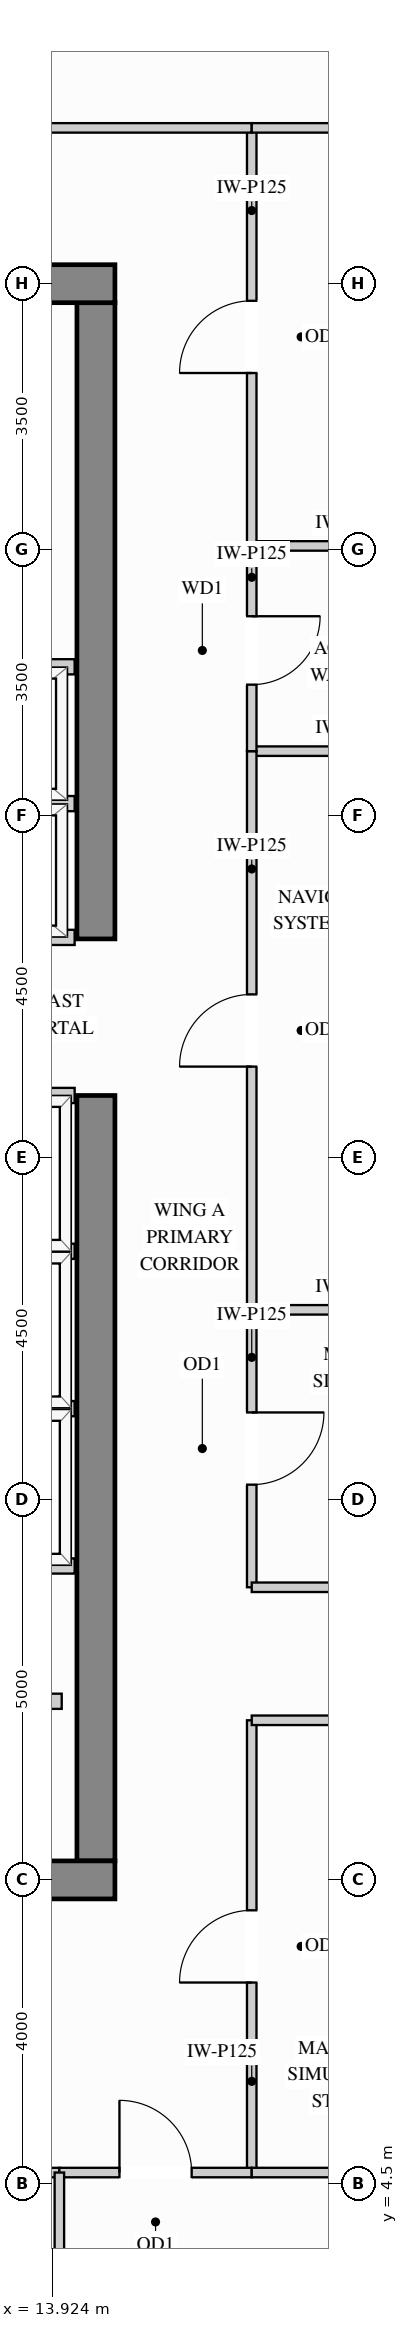
"""IFC4 building model, lengths in metres.
Left out: names, types, materials, properties, quantities, classifications, styles, units other than length and angle.
Written with IfcOpenShell. Run it as: python <this file> out.ifc"""

import sys

from ifc_helpers import new_model, si_unit, direction, frame, frame_2d, origin, place, context, subcontext, project, spatial, rectangle, extrude, source, transform, mapped, element, fill, save


model = new_model("IFC4")
c1 = context("Model", 3, precision=1e-05, world=origin(), true_north=direction((0.0, 1.0)))
c2 = subcontext(c1, "Body", "Model", "MODEL_VIEW")
j1 = project(units=[si_unit("LENGTHUNIT", "METRE"), si_unit("PLANEANGLEUNIT", "RADIAN")], contexts=[c1])
p1 = place(None, origin())
s1 = spatial("IfcSite", under=j1, at=p1, CompositionType="ELEMENT")
p2 = place(p1, origin())
s2 = spatial("IfcBuilding", under=s1, at=p2, CompositionType="ELEMENT")
p3 = place(p2, frame((0.0, 0.0, 255.6)))
s3 = spatial("IfcBuildingStorey", under=s2, at=p3, CompositionType="ELEMENT", Elevation=255.6)
m1 = source(origin(), c2, "Body", "SweptSolid", [
    extrude(rectangle(XDim=10.07, YDim=0.5, at=frame_2d((5.035, 0.0))), origin(), (0.0, 0.0, 1.0), 3.4),
])
p4 = place(p3, frame((14.5, 8.75, 0.0), z_axis=(0.0, 0.0, 1.0), x_axis=(0.0, 1.0, 0.0)))
e1 = element("IfcWall", 1, at=p4, inside=s3, PredefinedType="SHEAR", context=c2, shape_type="MappedRepresentation", body=[
    mapped(m1, transform((0.0, 0.0, 0.0), x_axis=(1.0, 0.0, 0.0), y_axis=(0.0, 1.0, 0.0), z_axis=(0.0, 0.0, 1.0))),
])
m2 = source(origin(), c2, "Body", "SweptSolid", [
    extrude(rectangle(XDim=8.37, YDim=0.5, at=frame_2d((4.185, 0.0))), origin(), (0.0, 0.0, 1.0), 3.4),
])
p5 = place(p3, frame((14.5, 20.88, 0.0), z_axis=(0.0, 0.0, 1.0), x_axis=(0.0, 1.0, 0.0)))
e2 = element("IfcWall", 2, at=p5, inside=s3, PredefinedType="SHEAR", context=c2, shape_type="MappedRepresentation", body=[
    mapped(m2, transform((0.0, 0.0, 0.0), x_axis=(1.0, 0.0, 0.0), y_axis=(0.0, 1.0, 0.0), z_axis=(0.0, 0.0, 1.0))),
])
m3 = source(origin(), c2, "Body", "SweptSolid", [
    extrude(rectangle(XDim=10.5, YDim=0.5, at=frame_2d((5.25, 0.0))), origin(), (0.0, 0.0, 1.0), 3.4),
])
for number, where, z_axis, x_axis in (
    (3, (4.25, 29.5, 0.0), (0.0, 0.0, 1.0), (1.0, 0.0, 0.0)),
    (4, (4.25, 8.5, 0.0), (0.0, 0.0, 1.0), (1.0, 0.0, 0.0)),
):
    element("IfcWall", number, at=place(p3, frame(where, z_axis=z_axis, x_axis=x_axis)), inside=s3, PredefinedType="SHEAR", context=c2, shape_type="MappedRepresentation", body=[
        mapped(m3, transform((0.0, 0.0, 0.0), x_axis=(1.0, 0.0, 0.0), y_axis=(0.0, 1.0, 0.0), z_axis=(0.0, 0.0, 1.0))),
    ])
m4 = source(origin(), c2, "Body", "SweptSolid", [
    extrude(rectangle(XDim=2.6, YDim=0.125, at=frame_2d((1.3, 0.0))), origin(), (0.0, 0.0, 1.0), 3.385),
])
p6 = place(p3, frame((16.55, 16.0, 0.0), z_axis=(0.0, 0.0, 1.0), x_axis=(1.0, 0.0, 0.0)))
e5 = element("IfcWall", 5, at=p6, inside=s3, PredefinedType="PARTITIONING", context=c2, shape_type="MappedRepresentation", body=[
    mapped(m4, transform((0.0, 0.0, 0.0), x_axis=(1.0, 0.0, 0.0), y_axis=(0.0, 1.0, 0.0), z_axis=(0.0, 0.0, 1.0))),
])
m5 = source(origin(), c2, "Body", "SweptSolid", [
    extrude(rectangle(XDim=2.598, YDim=0.125, at=frame_2d((1.299, 0.0))), origin(), (0.0, 0.0, 1.0), 3.385),
])
for number, where, z_axis, x_axis in (
    (6, (16.55, 23.35, 0.0), (0.0, 0.0, 1.0), (1.0, 0.0, 0.0)),
    (7, (16.55, 26.05, 0.0), (0.0, 0.0, 1.0), (1.0, 0.0, 0.0)),
):
    element("IfcWall", number, at=place(p3, frame(where, z_axis=z_axis, x_axis=x_axis)), inside=s3, PredefinedType="PARTITIONING", context=c2, shape_type="MappedRepresentation", body=[
        mapped(m5, transform((0.0, 0.0, 0.0), x_axis=(1.0, 0.0, 0.0), y_axis=(0.0, 1.0, 0.0), z_axis=(0.0, 0.0, 1.0))),
    ])
p7 = place(p3, frame((16.55, 12.35, 0.0), z_axis=(0.0, 0.0, 1.0), x_axis=(0.0, 1.0, 0.0)))
e8 = element("IfcWall", 8, at=p7, inside=s3, PredefinedType="PARTITIONING", context=c2, shape_type="SweptSolid", body=[
    extrude(rectangle(XDim=3.65, YDim=0.125, at=frame_2d((1.825, 0.0))), origin(), (0.0, 0.0, 1.0), 3.385),
])
p8 = place(p7, frame((1.35, 0.0, 0.0)))
e9 = element("IfcOpeningElement", 9, at=p8, cuts=e8, PredefinedType="OPENING", context=c2, shape_type="SweptSolid", body=[
    extrude(rectangle(XDim=0.95, YDim=2.15, at=frame_2d((0.475, 1.075))), frame((0.0, 0.073, 0.0), z_axis=(0.0, -1.0, 0.0), x_axis=(1.0, 0.0, 0.0)), (0.0, 0.0, 1.0), 0.145),
])
p9 = place(p3, frame((16.55, 16.0, 0.0), z_axis=(0.0, 0.0, 1.0), x_axis=(0.0, 1.0, 0.0)))
e10 = element("IfcWall", 10, at=p9, inside=s3, PredefinedType="PARTITIONING", context=c2, shape_type="SweptSolid", body=[
    extrude(rectangle(XDim=7.35, YDim=0.125, at=frame_2d((3.675, 0.0))), origin(), (0.0, 0.0, 1.0), 3.385),
])
p10 = place(p9, frame((3.2, 0.0, 0.0)))
e11 = element("IfcOpeningElement", 11, at=p10, cuts=e10, PredefinedType="OPENING", context=c2, shape_type="SweptSolid", body=[
    extrude(rectangle(XDim=0.95, YDim=2.15, at=frame_2d((0.475, 1.075))), frame((0.0, 0.073, 0.0), z_axis=(0.0, -1.0, 0.0), x_axis=(1.0, 0.0, 0.0)), (0.0, 0.0, 1.0), 0.145),
])
p11 = place(p3, frame((16.55, 26.05, 0.0), z_axis=(0.0, 0.0, 1.0), x_axis=(0.0, 1.0, 0.0)))
e12 = element("IfcWall", 12, at=p11, inside=s3, PredefinedType="PARTITIONING", context=c2, shape_type="SweptSolid", body=[
    extrude(rectangle(XDim=5.5, YDim=0.125, at=frame_2d((2.75, 0.0))), origin(), (0.0, 0.0, 1.0), 3.385),
])
p12 = place(p11, frame((2.275, 0.0, 0.0)))
e13 = element("IfcOpeningElement", 13, at=p12, cuts=e12, PredefinedType="OPENING", context=c2, shape_type="SweptSolid", body=[
    extrude(rectangle(XDim=0.95, YDim=2.15, at=frame_2d((0.475, 1.075))), frame((0.0, 0.073, 0.0), z_axis=(0.0, -1.0, 0.0), x_axis=(1.0, 0.0, 0.0)), (0.0, 0.0, 1.0), 0.145),
])
p13 = place(p3, frame((16.55, 4.65, 0.0), z_axis=(0.0, 0.0, 1.0), x_axis=(0.0, 1.0, 0.0)))
e14 = element("IfcWall", 14, at=p13, inside=s3, PredefinedType="PARTITIONING", context=c2, shape_type="SweptSolid", body=[
    extrude(rectangle(XDim=5.95, YDim=0.125, at=frame_2d((2.975, 0.0))), origin(), (0.0, 0.0, 1.0), 3.385),
])
p14 = place(p13, frame((2.5, 0.0, 0.0)))
e15 = element("IfcOpeningElement", 15, at=p14, cuts=e14, PredefinedType="OPENING", context=c2, shape_type="SweptSolid", body=[
    extrude(rectangle(XDim=0.95, YDim=2.15, at=frame_2d((0.475, 1.075))), frame((0.0, 0.073, 0.0), z_axis=(0.0, -1.0, 0.0), x_axis=(1.0, 0.0, 0.0)), (0.0, 0.0, 1.0), 0.145),
])
p15 = place(p3, frame((16.55, 23.35, 0.0), z_axis=(0.0, 0.0, 1.0), x_axis=(0.0, 1.0, 0.0)))
e16 = element("IfcWall", 16, at=p15, inside=s3, PredefinedType="PARTITIONING", context=c2, shape_type="SweptSolid", body=[
    extrude(rectangle(XDim=2.7, YDim=0.125, at=frame_2d((1.35, 0.0))), origin(), (0.0, 0.0, 1.0), 3.385),
])
p16 = place(p15, frame((0.875, 0.0, 0.0)))
e17 = element("IfcOpeningElement", 17, at=p16, cuts=e16, PredefinedType="OPENING", context=c2, shape_type="SweptSolid", body=[
    extrude(rectangle(XDim=0.9, YDim=2.15, at=frame_2d((0.45, 1.075))), frame((0.0, 0.073, 0.0), z_axis=(0.0, -1.0, 0.0), x_axis=(1.0, 0.0, 0.0)), (0.0, 0.0, 1.0), 0.145),
])
p17 = place(p3, frame((2.45, 31.55, 0.0), z_axis=(0.0, 0.0, 1.0), x_axis=(1.0, 0.0, 0.0)))
e18 = element("IfcWall", 18, at=p17, inside=s3, PredefinedType="PARTITIONING", context=c2, shape_type="SweptSolid", body=[
    extrude(rectangle(XDim=14.1, YDim=0.125, at=frame_2d((7.05, 0.0))), origin(), (0.0, 0.0, 1.0), 3.385),
])
p18 = place(p17, frame((6.575, 0.0, 0.0)))
e19 = element("IfcOpeningElement", 19, at=p18, cuts=e18, PredefinedType="OPENING", context=c2, shape_type="SweptSolid", body=[
    extrude(rectangle(XDim=0.95, YDim=2.15, at=frame_2d((0.475, 1.075))), frame((0.0, 0.073, 0.0), z_axis=(0.0, -1.0, 0.0), x_axis=(1.0, 0.0, 0.0)), (0.0, 0.0, 1.0), 0.145),
])
p19 = place(p3, frame((16.55, 31.55, 0.0), z_axis=(0.0, 0.0, 1.0), x_axis=(1.0, 0.0, 0.0)))
e20 = element("IfcWall", 20, at=p19, inside=s3, PredefinedType="PARTITIONING", context=c2, shape_type="MappedRepresentation", body=[
    mapped(m5, transform((0.0, 0.0, 0.0), x_axis=(1.0, 0.0, 0.0), y_axis=(0.0, 1.0, 0.0), z_axis=(0.0, 0.0, 1.0))),
])
m6 = source(origin(), c2, "Body", "SweptSolid", [
    extrude(rectangle(XDim=2.95, YDim=0.125, at=frame_2d((1.475, 0.0))), origin(), (0.0, 0.0, 1.0), 3.385),
])
for number, where, z_axis, x_axis in (
    (21, (16.55, 12.35, 0.0), (0.0, 0.0, 1.0), (1.0, 0.0, 0.0)),
    (22, (16.55, 10.6, 0.0), (0.0, 0.0, 1.0), (1.0, 0.0, 0.0)),
):
    element("IfcWall", number, at=place(p3, frame(where, z_axis=z_axis, x_axis=x_axis)), inside=s3, PredefinedType="PARTITIONING", context=c2, shape_type="MappedRepresentation", body=[
        mapped(m6, transform((0.0, 0.0, 0.0), x_axis=(1.0, 0.0, 0.0), y_axis=(0.0, 1.0, 0.0), z_axis=(0.0, 0.0, 1.0))),
    ])
p20 = place(p3, frame((8.227, 4.65, 0.0), z_axis=(0.0, 0.0, 1.0), x_axis=(1.0, 0.0, 0.0)))
e23 = element("IfcWall", 23, at=p20, inside=s3, PredefinedType="PARTITIONING", context=c2, shape_type="SweptSolid", body=[
    extrude(rectangle(XDim=5.792, YDim=0.125, at=frame_2d((2.896, 0.0))), origin(), (0.0, 0.0, 1.0), 2.848),
])
p21 = place(p20, frame((2.421, 0.0, 0.0)))
e24 = element("IfcOpeningElement", 24, at=p21, cuts=e23, PredefinedType="OPENING", context=c2, shape_type="SweptSolid", body=[
    extrude(rectangle(XDim=0.95, YDim=2.15, at=frame_2d((0.475, 1.075))), frame((0.0, 0.073, 0.0), z_axis=(0.0, -1.0, 0.0), x_axis=(1.0, 0.0, 0.0)), (0.0, 0.0, 1.0), 0.145),
])
p22 = place(p3, frame((14.019, 4.65, 0.0), z_axis=(0.0, 0.0, 1.0), x_axis=(1.0, 0.0, 0.0)))
e25 = element("IfcWall", 25, at=p22, inside=s3, PredefinedType="PARTITIONING", context=c2, shape_type="SweptSolid", body=[
    extrude(rectangle(XDim=2.531, YDim=0.125, at=frame_2d((1.266, 0.0))), origin(), (0.0, 0.0, 1.0), 2.848),
])
p23 = place(p22, frame((0.791, 0.0, 0.0)))
e26 = element("IfcOpeningElement", 26, at=p23, cuts=e25, PredefinedType="OPENING", context=c2, shape_type="SweptSolid", body=[
    extrude(rectangle(XDim=0.95, YDim=2.15, at=frame_2d((0.475, 1.075))), frame((0.0, 0.073, 0.0), z_axis=(0.0, -1.0, 0.0), x_axis=(1.0, 0.0, 0.0)), (0.0, 0.0, 1.0), 0.145),
])
m7 = source(origin(), c2, "Body", "SweptSolid", [
    extrude(rectangle(XDim=2.6, YDim=0.125, at=frame_2d((1.3, 0.0))), origin(), (0.0, 0.0, 1.0), 2.848),
])
p24 = place(p3, frame((16.55, 4.65, 0.0), z_axis=(0.0, 0.0, 1.0), x_axis=(1.0, 0.0, 0.0)))
e27 = element("IfcWall", 27, at=p24, inside=s3, PredefinedType="PARTITIONING", context=c2, shape_type="MappedRepresentation", body=[
    mapped(m7, transform((0.0, 0.0, 0.0), x_axis=(1.0, 0.0, 0.0), y_axis=(0.0, 1.0, 0.0), z_axis=(0.0, 0.0, 1.0))),
])
m8 = source(origin(), c2, "Body", "SweptSolid", [
    extrude(rectangle(XDim=4.298, YDim=0.125, at=frame_2d((2.149, 0.0))), origin(), (0.0, 0.0, 1.0), 3.385),
])
p25 = place(p3, frame((14.019, 0.352, 0.0), z_axis=(0.0, 0.0, 1.0), x_axis=(0.0, 1.0, 0.0)))
e28 = element("IfcWall", 28, at=p25, inside=s3, PredefinedType="PARTITIONING", context=c2, shape_type="MappedRepresentation", body=[
    mapped(m8, transform((0.0, 0.0, 0.0), x_axis=(1.0, 0.0, 0.0), y_axis=(0.0, 1.0, 0.0), z_axis=(0.0, 0.0, 1.0))),
])
m9 = source(origin(), c2, "Body", "SweptSolid", [
    extrude(rectangle(XDim=1.63, YDim=0.2, at=frame_2d((0.815, 0.0))), origin(), (0.0, 0.0, 1.0), 3.385),
])
p26 = place(p3, frame((12.42, 10.85, 0.0), z_axis=(0.0, 0.0, 1.0), x_axis=(1.0, 0.0, 0.0)))
e29 = element("IfcWall", 29, at=p26, inside=s3, PredefinedType="PARTITIONING", context=c2, shape_type="MappedRepresentation", body=[
    mapped(m9, transform((0.0, 0.0, 0.0), x_axis=(1.0, 0.0, 0.0), y_axis=(0.0, 1.0, 0.0), z_axis=(0.0, 0.0, 1.0))),
])
m10 = source(origin(), c2, "Body", "SweptSolid", [
    extrude(rectangle(XDim=2.39, YDim=0.2, at=frame_2d((1.195, 0.0))), origin(), (0.0, 0.0, 1.0), 3.385),
])
for number, where, z_axis, x_axis in (
    (30, (11.83, 22.66, 0.0), (0.0, 0.0, 1.0), (1.0, 0.0, 0.0)),
    (31, (11.83, 20.9, 0.0), (0.0, 0.0, 1.0), (1.0, 0.0, 0.0)),
    (32, (11.83, 24.46, 0.0), (0.0, 0.0, 1.0), (1.0, 0.0, 0.0)),
):
    element("IfcWall", number, at=place(p3, frame(where, z_axis=z_axis, x_axis=x_axis)), inside=s3, PredefinedType="PARTITIONING", context=c2, shape_type="MappedRepresentation", body=[
        mapped(m10, transform((0.0, 0.0, 0.0), x_axis=(1.0, 0.0, 0.0), y_axis=(0.0, 1.0, 0.0), z_axis=(0.0, 0.0, 1.0))),
    ])
m11 = source(origin(), c2, "Body", "SweptSolid", [
    extrude(rectangle(XDim=1.99, YDim=0.2, at=frame_2d((0.995, 0.0))), origin(), (0.0, 0.0, 1.0), 3.385),
])
for number, where, z_axis, x_axis in (
    (33, (12.23, 14.7, 0.0), (0.0, 0.0, 1.0), (1.0, 0.0, 0.0)),
    (34, (12.23, 12.63, 0.0), (0.0, 0.0, 1.0), (1.0, 0.0, 0.0)),
    (35, (12.23, 16.77, 0.0), (0.0, 0.0, 1.0), (1.0, 0.0, 0.0)),
    (36, (12.23, 18.82, 0.0), (0.0, 0.0, 1.0), (1.0, 0.0, 0.0)),
):
    element("IfcWall", number, at=place(p3, frame(where, z_axis=z_axis, x_axis=x_axis)), inside=s3, PredefinedType="PARTITIONING", context=c2, shape_type="MappedRepresentation", body=[
        mapped(m11, transform((0.0, 0.0, 0.0), x_axis=(1.0, 0.0, 0.0), y_axis=(0.0, 1.0, 0.0), z_axis=(0.0, 0.0, 1.0))),
    ])
m12 = source(origin(), c2, "Body", "SweptSolid", [
    extrude(rectangle(XDim=0.95, YDim=2.15, at=frame_2d((0.475, 1.075))), frame((0.0, 0.025, 0.0), z_axis=(0.0, -1.0, 0.0), x_axis=(1.0, 0.0, 0.0)), (0.0, 0.0, 1.0), 0.05),
])
p27 = place(p14, origin())
e37 = element("IfcDoor", 37, at=p27, inside=s3, OperationType="SINGLE_SWING_LEFT", PredefinedType="DOOR", context=c2, shape_type="MappedRepresentation", body=[
    mapped(m12, transform((0.0, 0.0, 0.0), x_axis=(1.0, 0.0, 0.0), y_axis=(0.0, 1.0, 0.0), z_axis=(0.0, 0.0, 1.0))),
])
fill(e15, e37)
p28 = place(p8, origin())
e38 = element("IfcDoor", 38, at=p28, inside=s3, OperationType="SINGLE_SWING_RIGHT", PredefinedType="DOOR", context=c2, shape_type="MappedRepresentation", body=[
    mapped(m12, transform((0.0, 0.0, 0.0), x_axis=(1.0, 0.0, 0.0), y_axis=(0.0, 1.0, 0.0), z_axis=(0.0, 0.0, 1.0))),
])
fill(e9, e38)
p29 = place(p10, origin())
e39 = element("IfcDoor", 39, at=p29, inside=s3, OperationType="SINGLE_SWING_LEFT", PredefinedType="DOOR", context=c2, shape_type="MappedRepresentation", body=[
    mapped(m12, transform((0.0, 0.0, 0.0), x_axis=(1.0, 0.0, 0.0), y_axis=(0.0, 1.0, 0.0), z_axis=(0.0, 0.0, 1.0))),
])
fill(e11, e39)
p30 = place(p12, origin())
e40 = element("IfcDoor", 40, at=p30, inside=s3, OperationType="SINGLE_SWING_LEFT", PredefinedType="DOOR", context=c2, shape_type="MappedRepresentation", body=[
    mapped(m12, transform((0.0, 0.0, 0.0), x_axis=(1.0, 0.0, 0.0), y_axis=(0.0, 1.0, 0.0), z_axis=(0.0, 0.0, 1.0))),
])
fill(e13, e40)
p31 = place(p23, origin())
e41 = element("IfcDoor", 41, at=p31, inside=s3, OperationType="SINGLE_SWING_LEFT", PredefinedType="DOOR", context=c2, shape_type="MappedRepresentation", body=[
    mapped(m12, transform((0.0, 0.0, 0.0), x_axis=(1.0, 0.0, 0.0), y_axis=(0.0, 1.0, 0.0), z_axis=(0.0, 0.0, 1.0))),
])
fill(e26, e41)
m13 = source(origin(), c2, "Body", "SweptSolid", [
    extrude(rectangle(XDim=0.9, YDim=2.15, at=frame_2d((0.45, 1.075))), frame((0.0, 0.025, 0.0), z_axis=(0.0, -1.0, 0.0), x_axis=(1.0, 0.0, 0.0)), (0.0, 0.0, 1.0), 0.05),
])
p32 = place(p16, origin())
e42 = element("IfcDoor", 42, at=p32, inside=s3, OperationType="SINGLE_SWING_RIGHT", PredefinedType="DOOR", context=c2, shape_type="MappedRepresentation", body=[
    mapped(m13, transform((0.0, 0.0, 0.0), x_axis=(1.0, 0.0, 0.0), y_axis=(0.0, 1.0, 0.0), z_axis=(0.0, 0.0, 1.0))),
])
fill(e17, e42)
save(model, sys.argv[1])
